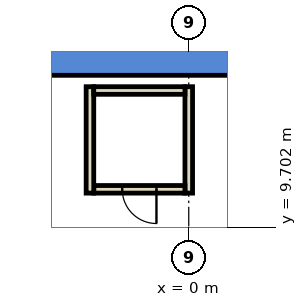
"""IFC4 building model, lengths in metres.
Left out: names, types, materials, properties, quantities, classifications, styles, units other than length and angle.
Written with IfcOpenShell. Run it as: python <this file> out.ifc"""

import sys

from ifc_helpers import new_model, si_unit, direction, frame, frame_2d, origin, place, context, subcontext, project, spatial, polyline, rectangle, outline, extrude, element, fill, save


model = new_model("IFC4")
c1 = context("Model", 3, precision=1e-05, world=origin(), true_north=direction((0.0, 1.0)))
c2 = subcontext(c1, "Body", "Model", "MODEL_VIEW")
j1 = project(units=[si_unit("LENGTHUNIT", "METRE"), si_unit("PLANEANGLEUNIT", "RADIAN")], contexts=[c1])
p1 = place(None, origin())
s1 = spatial("IfcSite", under=j1, at=p1, CompositionType="ELEMENT")
p2 = place(p1, origin())
s2 = spatial("IfcBuilding", under=s1, at=p2, CompositionType="ELEMENT")
p3 = place(p2, frame((0.0, 0.0, 142.4)))
s3 = spatial("IfcBuildingStorey", under=s2, at=p3, CompositionType="ELEMENT", Elevation=142.4)
p4 = place(p3, frame((0.0, 0.0, -0.4)))
e1 = element("IfcWall", 1, at=p4, inside=s3, PredefinedType="SHEAR", context=c2, shape_type="SweptSolid", body=[
    extrude(outline(polyline([(6.928, 14.5), (-6.928, 14.5), (-6.466, 13.7), (6.466, 13.7), (6.928, 14.5)])), origin(), (0.0, 0.0, 1.0), 4.2),
])
p5 = place(p3, frame((0.0, 13.4, 0.0), z_axis=(0.0, 0.0, 1.0), x_axis=(0.0, -1.0, 0.0)))
e2 = element("IfcWall", 2, at=p5, inside=s3, PredefinedType="PARTITIONING", context=c2, shape_type="SweptSolid", body=[
    extrude(rectangle(XDim=2.8, YDim=0.2, at=frame_2d((1.4, 0.0))), origin(), (0.0, 0.0, 1.0), 3.8),
])
p6 = place(p3, frame((-0.1, 10.7, 0.0), z_axis=(0.0, 0.0, 1.0), x_axis=(-1.0, 0.0, 0.0)))
e3 = element("IfcWall", 3, at=p6, inside=s3, PredefinedType="PARTITIONING", context=c2, shape_type="SweptSolid", body=[
    extrude(rectangle(XDim=2.4, YDim=0.2, at=frame_2d((1.2, 0.0))), origin(), (0.0, 0.0, 1.0), 3.8),
])
p7 = place(p6, frame((0.75, 0.0, 0.0)))
e4 = element("IfcOpeningElement", 4, at=p7, cuts=e3, PredefinedType="OPENING", context=c2, shape_type="SweptSolid", body=[
    extrude(rectangle(XDim=0.9, YDim=2.1, at=frame_2d((0.45, 1.05))), frame((0.0, 0.11, 0.0), z_axis=(0.0, -1.0, 0.0), x_axis=(1.0, 0.0, 0.0)), (0.0, 0.0, 1.0), 0.22),
])
p8 = place(p3, frame((-2.6, 10.6, 0.0), z_axis=(0.0, 0.0, 1.0), x_axis=(0.0, 1.0, 0.0)))
e5 = element("IfcWall", 5, at=p8, inside=s3, PredefinedType="PARTITIONING", context=c2, shape_type="SweptSolid", body=[
    extrude(rectangle(XDim=2.8, YDim=0.2, at=frame_2d((1.4, 0.0))), origin(), (0.0, 0.0, 1.0), 3.8),
])
p9 = place(p3, frame((-2.5, 13.3, 0.0), z_axis=(0.0, 0.0, 1.0), x_axis=(1.0, 0.0, 0.0)))
e6 = element("IfcWall", 6, at=p9, inside=s3, PredefinedType="PARTITIONING", context=c2, shape_type="SweptSolid", body=[
    extrude(rectangle(XDim=2.4, YDim=0.2, at=frame_2d((1.2, 0.0))), origin(), (0.0, 0.0, 1.0), 3.8),
])
p10 = place(p7, origin())
e7 = element("IfcDoor", 7, at=p10, inside=s3, OperationType="SINGLE_SWING_RIGHT", PredefinedType="DOOR", context=c2, shape_type="SweptSolid", body=[
    extrude(rectangle(XDim=0.9, YDim=2.1, at=frame_2d((0.45, 1.05))), frame((0.0, 0.025, 0.0), z_axis=(0.0, -1.0, 0.0), x_axis=(1.0, 0.0, 0.0)), (0.0, 0.0, 1.0), 0.05),
])
fill(e4, e7)
save(model, sys.argv[1])
